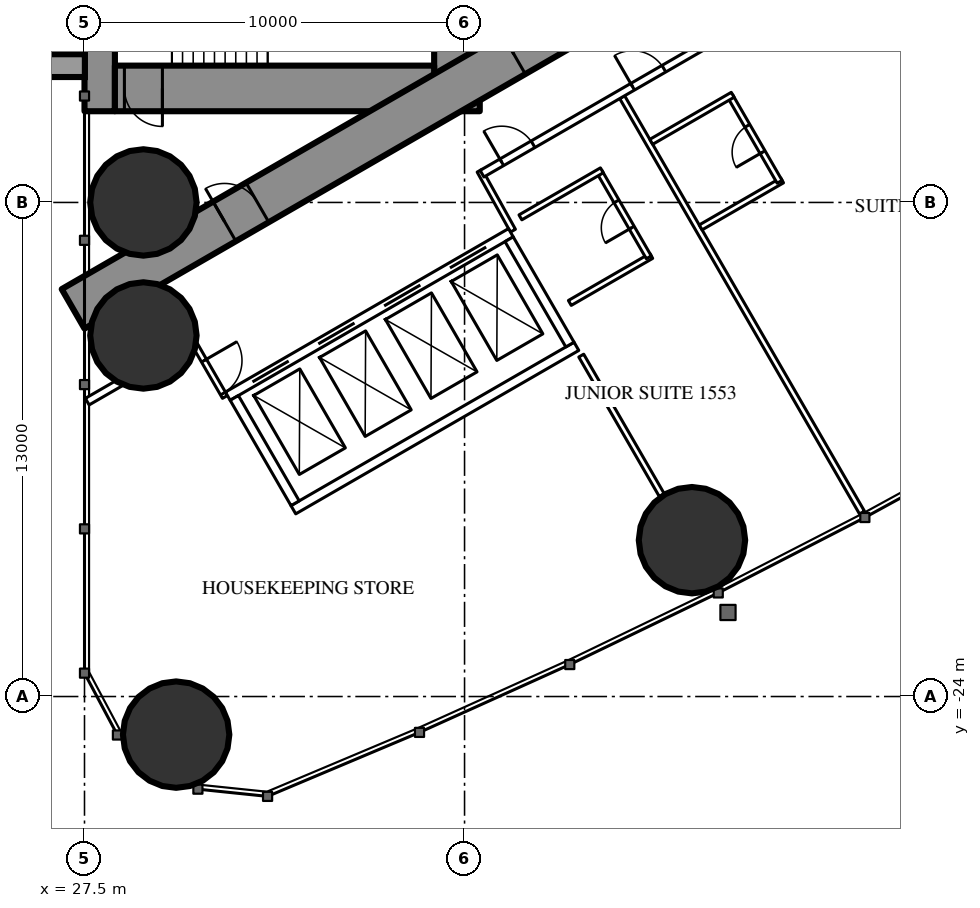
"""IFC4 building model, lengths in metres.
Left out: names, types, materials, properties, quantities, classifications, styles, units other than length and angle.
Written with IfcOpenShell. Run it as: python <this file> out.ifc"""

import sys

from ifc_helpers import new_model, si_unit, direction, frame, frame_2d, origin, origin_2d, place, context, subcontext, project, spatial, rectangle, hollow_circle, extrude, element, fill, save


model = new_model("IFC4")
c1 = context("Model", 3, precision=1e-05, world=origin(), true_north=direction((0.0, 1.0)))
c2 = subcontext(c1, "Body", "Model", "MODEL_VIEW")
j1 = project(units=[si_unit("LENGTHUNIT", "METRE"), si_unit("PLANEANGLEUNIT", "RADIAN")], contexts=[c1])
p1 = place(None, origin())
s1 = spatial("IfcSite", under=j1, at=p1, CompositionType="ELEMENT")
p2 = place(p1, origin())
s2 = spatial("IfcBuilding", under=s1, at=p2, CompositionType="ELEMENT")
p3 = place(p2, frame((0.0, 0.0, 60.0)))
s3 = spatial("IfcBuildingStorey", under=s2, at=p3, CompositionType="ELEMENT", Elevation=60.0)
for number, where, z_axis, x_axis in (
    (1, (29.911, -25.002, 0.0), (0.0, 0.0, 1.0), (1.0, 0.0, 0.0)),
    (2, (29.05, -11.0, 0.0), (0.0, 0.0, 1.0), (1.0, 0.0, 0.0)),
    (3, (29.05, -14.5, 0.0), (0.0, 0.0, 1.0), (1.0, 0.0, 0.0)),
    (4, (43.484, -19.886, 0.0), (0.0, 0.0, 1.0), (1.0, 0.0, 0.0)),
):
    element("IfcColumn", number, at=place(p3, frame(where, z_axis=z_axis, x_axis=x_axis)), inside=s3, PredefinedType="COLUMN", context=c2, shape_type="SweptSolid", body=[
        extrude(hollow_circle(Radius=1.4, WallThickness=0.12, at=origin_2d()), origin(), (0.0, 0.0, 1.0), 3.5),
    ])
p4 = place(p3, frame((27.9, -8.6, 0.0), z_axis=(0.0, 0.0, 1.0), x_axis=(0.0, 1.0, 0.0)))
e5 = element("IfcWall", 5, at=p4, inside=s3, PredefinedType="SHEAR", context=c2, shape_type="SweptSolid", body=[
    extrude(rectangle(XDim=17.2, YDim=0.8, at=frame_2d((8.6, 0.0))), origin(), (0.0, 0.0, 1.0), 3.5),
])
p5 = place(p4, frame((2.45, 0.0, 0.6)))
e6 = element("IfcOpeningElement", 6, at=p5, cuts=e5, PredefinedType="OPENING", context=c2, shape_type="SweptSolid", body=[
    extrude(rectangle(XDim=0.6, YDim=2.1, at=frame_2d((0.3, 1.05))), frame((0.0, 0.41, 0.0), z_axis=(0.0, -1.0, 0.0), x_axis=(1.0, 0.0, 0.0)), (0.0, 0.0, 1.0), 0.82),
])
p6 = place(p4, frame((14.15, 0.0, 0.6)))
e7 = element("IfcOpeningElement", 7, at=p6, cuts=e5, PredefinedType="OPENING", context=c2, shape_type="SweptSolid", body=[
    extrude(rectangle(XDim=0.6, YDim=2.1, at=frame_2d((0.3, 1.05))), frame((0.0, 0.41, 0.0), z_axis=(0.0, -1.0, 0.0), x_axis=(1.0, 0.0, 0.0)), (0.0, 0.0, 1.0), 0.82),
])
p7 = place(p3, frame((37.3, -8.6, 0.0), z_axis=(0.0, 0.0, 1.0), x_axis=(0.0, 1.0, 0.0)))
e8 = element("IfcWall", 8, at=p7, inside=s3, PredefinedType="SHEAR", context=c2, shape_type="SweptSolid", body=[
    extrude(rectangle(XDim=17.2, YDim=1.2, at=frame_2d((8.6, 0.0))), origin(), (0.0, 0.0, 1.0), 3.5),
])
p8 = place(p7, frame((7.7, 0.0, 0.0)))
e9 = element("IfcOpeningElement", 9, at=p8, cuts=e8, PredefinedType="OPENING", context=c2, shape_type="SweptSolid", body=[
    extrude(rectangle(XDim=1.8, YDim=2.2, at=frame_2d((0.9, 1.1))), frame((0.0, 0.61, 0.0), z_axis=(0.0, -1.0, 0.0), x_axis=(1.0, 0.0, 0.0)), (0.0, 0.0, 1.0), 1.22),
])
p9 = place(p3, frame((28.3, -8.0, 0.0), z_axis=(0.0, 0.0, 1.0), x_axis=(1.0, 0.0, 0.0)))
e10 = element("IfcWall", 10, at=p9, inside=s3, PredefinedType="SHEAR", context=c2, shape_type="SweptSolid", body=[
    extrude(rectangle(XDim=8.4, YDim=1.2, at=frame_2d((4.2, 0.0))), origin(), (0.0, 0.0, 1.0), 3.5),
])
p10 = place(p9, frame((0.25, 0.0, 0.0)))
e11 = element("IfcOpeningElement", 11, at=p10, cuts=e10, PredefinedType="OPENING", context=c2, shape_type="SweptSolid", body=[
    extrude(rectangle(XDim=1.0, YDim=2.2, at=frame_2d((0.5, 1.1))), frame((0.0, 0.61, 0.0), z_axis=(0.0, -1.0, 0.0), x_axis=(1.0, 0.0, 0.0)), (0.0, 0.0, 1.0), 1.22),
])
p11 = place(p3, frame((27.2, -13.8, 0.0), z_axis=(0.0, 0.0, 1.0), x_axis=(0.866027159892, 0.499996958321, 0.0)))
e12 = element("IfcWall", 12, at=p11, inside=s3, PredefinedType="SHEAR", context=c2, shape_type="SweptSolid", body=[
    extrude(rectangle(XDim=27.947, YDim=1.2, at=frame_2d((13.973, 0.0))), origin(), (0.0, 0.0, 1.0), 3.5),
])
p12 = place(p11, frame((4.6, 0.0, 0.0)))
e13 = element("IfcOpeningElement", 13, at=p12, cuts=e12, PredefinedType="OPENING", context=c2, shape_type="SweptSolid", body=[
    extrude(rectangle(XDim=1.0, YDim=2.2, at=frame_2d((0.5, 1.1))), frame((0.0, 0.61, 0.0), z_axis=(0.0, -1.0, 0.0), x_axis=(1.0, 0.0, 0.0)), (0.0, 0.0, 1.0), 1.22),
])
p13 = place(p11, frame((13.395, 0.0, 0.0)))
e14 = element("IfcOpeningElement", 14, at=p13, cuts=e12, PredefinedType="OPENING", context=c2, shape_type="SweptSolid", body=[
    extrude(rectangle(XDim=1.8, YDim=2.2, at=frame_2d((0.9, 1.1))), frame((0.0, 0.61, 0.0), z_axis=(0.0, -1.0, 0.0), x_axis=(1.0, 0.0, 0.0)), (0.0, 0.0, 1.0), 1.22),
])
p14 = place(p3, frame((41.647, -8.23, 0.0), z_axis=(0.0, 0.0, 1.0), x_axis=(0.49998590462, -0.866033541603, 0.0)))
e15 = element("IfcWall", 15, at=p14, inside=s3, PredefinedType="PARTITIONING", context=c2, shape_type="SweptSolid", body=[
    extrude(rectangle(XDim=12.621, YDim=0.15, at=frame_2d((6.311, 0.0))), origin(), (0.0, 0.0, 1.0), 3.25),
])
p15 = place(p3, frame((40.57, -15.03, 0.0), z_axis=(0.0, 0.0, 1.0), x_axis=(0.500012993597, -0.866017901798, 0.0)))
e16 = element("IfcWall", 16, at=p15, inside=s3, PredefinedType="PARTITIONING", context=c2, shape_type="SweptSolid", body=[
    extrude(rectangle(XDim=4.243, YDim=0.15, at=frame_2d((2.122, 0.0))), origin(), (0.0, 0.0, 1.0), 3.25),
])
p16 = place(p3, frame((27.572, -16.241, 0.0), z_axis=(0.0, 0.0, 1.0), x_axis=(0.866029654818, 0.499992636921, 0.0)))
e17 = element("IfcWall", 17, at=p16, inside=s3, PredefinedType="PARTITIONING", context=c2, shape_type="SweptSolid", body=[
    extrude(rectangle(XDim=3.155, YDim=0.2, at=frame_2d((1.577, 0.0))), origin(), (0.0, 0.0, 1.0), 3.25),
])
p17 = place(p3, frame((38.773, -11.742, 0.0), z_axis=(0.0, 0.0, 1.0), x_axis=(-0.485528096672, 0.8742210632, 0.0)))
e18 = element("IfcWall", 18, at=p17, inside=s3, PredefinedType="PARTITIONING", context=c2, shape_type="SweptSolid", body=[
    extrude(rectangle(XDim=1.805, YDim=0.15, at=frame_2d((0.903, 0.0))), origin(), (0.0, 0.0, 1.0), 3.25),
])
p18 = place(p3, frame((30.293, -14.554, 0.0), z_axis=(0.0, 0.0, 1.0), x_axis=(0.499980071345, -0.866036909293, 0.0)))
e19 = element("IfcWall", 19, at=p18, inside=s3, PredefinedType="PARTITIONING", context=c2, shape_type="SweptSolid", body=[
    extrude(rectangle(XDim=1.805, YDim=0.15, at=frame_2d((0.902, 0.0))), origin(), (0.0, 0.0, 1.0), 3.25),
])
p19 = place(p18, frame((0.702, 0.0, 0.0)))
e20 = element("IfcOpeningElement", 20, at=p19, cuts=e19, PredefinedType="OPENING", context=c2, shape_type="SweptSolid", body=[
    extrude(rectangle(XDim=1.0, YDim=2.2, at=frame_2d((0.5, 1.1))), frame((0.0, 0.085, 0.0), z_axis=(0.0, -1.0, 0.0), x_axis=(1.0, 0.0, 0.0)), (0.0, 0.0, 1.0), 0.17),
])
p20 = place(p3, frame((37.96, -10.243, 0.0), z_axis=(0.0, 0.0, 1.0), x_axis=(0.866030548046, 0.499991089772, 0.0)))
e21 = element("IfcWall", 21, at=p20, inside=s3, PredefinedType="PARTITIONING", context=c2, shape_type="SweptSolid", body=[
    extrude(rectangle(XDim=12.849, YDim=0.2, at=frame_2d((6.425, 0.0))), origin(), (0.0, 0.0, 1.0), 3.25),
])
p21 = place(p20, frame((4.575, 0.0, 0.0)))
e22 = element("IfcOpeningElement", 22, at=p21, cuts=e21, PredefinedType="OPENING", context=c2, shape_type="SweptSolid", body=[
    extrude(rectangle(XDim=0.95, YDim=2.2, at=frame_2d((0.475, 1.1))), frame((0.0, 0.11, 0.0), z_axis=(0.0, -1.0, 0.0), x_axis=(1.0, 0.0, 0.0)), (0.0, 0.0, 1.0), 0.22),
])
p22 = place(p20, frame((0.6, 0.0, 0.0)))
e23 = element("IfcOpeningElement", 23, at=p22, cuts=e21, PredefinedType="OPENING", context=c2, shape_type="SweptSolid", body=[
    extrude(rectangle(XDim=0.95, YDim=2.2, at=frame_2d((0.475, 1.1))), frame((0.0, 0.11, 0.0), z_axis=(0.0, -1.0, 0.0), x_axis=(1.0, 0.0, 0.0)), (0.0, 0.0, 1.0), 0.22),
])
p23 = place(p3, frame((43.712, -11.657, 0.0), z_axis=(0.0, 0.0, 1.0), x_axis=(0.866006523861, 0.500032699561, 0.0)))
e24 = element("IfcWall", 24, at=p23, inside=s3, PredefinedType="PARTITIONING", context=c2, shape_type="SweptSolid", body=[
    extrude(rectangle(XDim=2.475, YDim=0.15, at=frame_2d((1.237, 0.0))), origin(), (0.0, 0.0, 1.0), 3.25),
])
p24 = place(p3, frame((44.491, -8.205, 0.0), z_axis=(0.0, 0.0, 1.0), x_axis=(0.500047596559, -0.865997922154, 0.0)))
e25 = element("IfcWall", 25, at=p24, inside=s3, PredefinedType="PARTITIONING", context=c2, shape_type="SweptSolid", body=[
    extrude(rectangle(XDim=2.6, YDim=0.15, at=frame_2d((1.3, 0.0))), origin(), (0.0, 0.0, 1.0), 3.25),
])
p25 = place(p24, frame((0.9, 0.0, 0.0)))
e26 = element("IfcOpeningElement", 26, at=p25, cuts=e25, PredefinedType="OPENING", context=c2, shape_type="SweptSolid", body=[
    extrude(rectangle(XDim=0.8, YDim=2.2, at=frame_2d((0.4, 1.1))), frame((0.0, 0.085, 0.0), z_axis=(0.0, -1.0, 0.0), x_axis=(1.0, 0.0, 0.0)), (0.0, 0.0, 1.0), 0.17),
])
p26 = place(p3, frame((42.412, -9.405, 0.0), z_axis=(0.0, 0.0, 1.0), x_axis=(0.866006523861, 0.500032699561, 0.0)))
e27 = element("IfcWall", 27, at=p26, inside=s3, PredefinedType="PARTITIONING", context=c2, shape_type="SweptSolid", body=[
    extrude(rectangle(XDim=2.475, YDim=0.15, at=frame_2d((1.237, 0.0))), origin(), (0.0, 0.0, 1.0), 3.25),
])
p27 = place(p3, frame((40.27, -13.644, 0.0), z_axis=(0.0, 0.0, 1.0), x_axis=(0.866031185235, 0.4999899861, 0.0)))
e28 = element("IfcWall", 28, at=p27, inside=s3, PredefinedType="PARTITIONING", context=c2, shape_type="SweptSolid", body=[
    extrude(rectangle(XDim=2.475, YDim=0.15, at=frame_2d((1.238, 0.0))), origin(), (0.0, 0.0, 1.0), 3.25),
])
p28 = place(p3, frame((41.048, -10.193, 0.0), z_axis=(0.0, 0.0, 1.0), x_axis=(0.500047596559, -0.865997922154, 0.0)))
e29 = element("IfcWall", 29, at=p28, inside=s3, PredefinedType="PARTITIONING", context=c2, shape_type="SweptSolid", body=[
    extrude(rectangle(XDim=2.6, YDim=0.15, at=frame_2d((1.3, 0.0))), origin(), (0.0, 0.0, 1.0), 3.25),
])
p29 = place(p28, frame((0.9, 0.0, 0.0)))
e30 = element("IfcOpeningElement", 30, at=p29, cuts=e29, PredefinedType="OPENING", context=c2, shape_type="SweptSolid", body=[
    extrude(rectangle(XDim=0.8, YDim=2.2, at=frame_2d((0.4, 1.1))), frame((0.0, 0.085, 0.0), z_axis=(0.0, -1.0, 0.0), x_axis=(1.0, 0.0, 0.0)), (0.0, 0.0, 1.0), 0.17),
])
p30 = place(p3, frame((38.97, -11.393, 0.0), z_axis=(0.0, 0.0, 1.0), x_axis=(0.866031185235, 0.4999899861, 0.0)))
e31 = element("IfcWall", 31, at=p30, inside=s3, PredefinedType="PARTITIONING", context=c2, shape_type="SweptSolid", body=[
    extrude(rectangle(XDim=2.475, YDim=0.15, at=frame_2d((1.238, 0.0))), origin(), (0.0, 0.0, 1.0), 3.25),
])
p31 = place(p3, frame((31.271, -16.097, 0.0), z_axis=(0.0, 0.0, 1.0), x_axis=(0.86604045752, 0.499973925258, 0.0)))
e32 = element("IfcWall", 32, at=p31, inside=s3, PredefinedType="PARTITIONING", context=c2, shape_type="SweptSolid", body=[
    extrude(rectangle(XDim=8.6, YDim=0.25, at=frame_2d((4.3, 0.0))), origin(), (0.0, 0.0, 1.0), 3.25),
])
p32 = place(p31, frame((0.75, 0.0, 0.0)))
e33 = element("IfcOpeningElement", 33, at=p32, cuts=e32, PredefinedType="OPENING", context=c2, shape_type="SweptSolid", body=[
    extrude(rectangle(XDim=1.1, YDim=2.2, at=frame_2d((0.55, 1.1))), frame((0.0, 0.135, 0.0), z_axis=(0.0, -1.0, 0.0), x_axis=(1.0, 0.0, 0.0)), (0.0, 0.0, 1.0), 0.27),
])
p33 = place(p31, frame((2.75, 0.0, 0.0)))
e34 = element("IfcOpeningElement", 34, at=p33, cuts=e32, PredefinedType="OPENING", context=c2, shape_type="SweptSolid", body=[
    extrude(rectangle(XDim=1.1, YDim=2.2, at=frame_2d((0.55, 1.1))), frame((0.0, 0.135, 0.0), z_axis=(0.0, -1.0, 0.0), x_axis=(1.0, 0.0, 0.0)), (0.0, 0.0, 1.0), 0.27),
])
p34 = place(p31, frame((4.75, 0.0, 0.0)))
e35 = element("IfcOpeningElement", 35, at=p34, cuts=e32, PredefinedType="OPENING", context=c2, shape_type="SweptSolid", body=[
    extrude(rectangle(XDim=1.1, YDim=2.2, at=frame_2d((0.55, 1.1))), frame((0.0, 0.135, 0.0), z_axis=(0.0, -1.0, 0.0), x_axis=(1.0, 0.0, 0.0)), (0.0, 0.0, 1.0), 0.27),
])
p35 = place(p31, frame((6.75, 0.0, 0.0)))
e36 = element("IfcOpeningElement", 36, at=p35, cuts=e32, PredefinedType="OPENING", context=c2, shape_type="SweptSolid", body=[
    extrude(rectangle(XDim=1.1, YDim=2.2, at=frame_2d((0.55, 1.1))), frame((0.0, 0.135, 0.0), z_axis=(0.0, -1.0, 0.0), x_axis=(1.0, 0.0, 0.0)), (0.0, 0.0, 1.0), 0.27),
])
p36 = place(p3, frame((32.996, -19.086, 0.0), z_axis=(0.0, 0.0, 1.0), x_axis=(0.866028165386, 0.499995216735, 0.0)))
e37 = element("IfcWall", 37, at=p36, inside=s3, PredefinedType="PARTITIONING", context=c2, shape_type="SweptSolid", body=[
    extrude(rectangle(XDim=8.6, YDim=0.25, at=frame_2d((4.3, 0.0))), origin(), (0.0, 0.0, 1.0), 3.25),
])
for number, where, z_axis, x_axis in (
    (38, (31.441, -16.143, 0.0), (0.0, 0.0, 1.0), (0.5, -0.866, 0.0)),
    (39, (38.673, -11.968, 0.0), (0.0, 0.0, 1.0), (0.5, -0.866, 0.0)),
):
    element("IfcWall", number, at=place(p3, frame(where, z_axis=z_axis, x_axis=x_axis)), inside=s3, PredefinedType="PARTITIONING", context=c2, shape_type="SweptSolid", body=[
        extrude(rectangle(XDim=3.201, YDim=0.25, at=frame_2d((1.6, 0.0))), origin(), (0.0, 0.0, 1.0), 3.25),
    ])
p37 = place(p25, origin())
e40 = element("IfcDoor", 40, at=p37, inside=s3, OperationType="SINGLE_SWING_RIGHT", PredefinedType="DOOR", context=c2, shape_type="SweptSolid", body=[
    extrude(rectangle(XDim=0.8, YDim=2.2, at=frame_2d((0.4, 1.1))), frame((0.0, 0.025, 0.0), z_axis=(0.0, -1.0, 0.0), x_axis=(1.0, 0.0, 0.0)), (0.0, 0.0, 1.0), 0.05),
])
fill(e26, e40)
p38 = place(p21, origin())
e41 = element("IfcDoor", 41, at=p38, inside=s3, OperationType="SINGLE_SWING_LEFT", PredefinedType="DOOR", context=c2, shape_type="SweptSolid", body=[
    extrude(rectangle(XDim=0.95, YDim=2.2, at=frame_2d((0.475, 1.1))), frame((0.0, 0.025, 0.0), z_axis=(0.0, -1.0, 0.0), x_axis=(1.0, 0.0, 0.0)), (0.0, 0.0, 1.0), 0.05),
])
fill(e22, e41)
p39 = place(p29, origin())
e42 = element("IfcDoor", 42, at=p39, inside=s3, OperationType="SINGLE_SWING_RIGHT", PredefinedType="DOOR", context=c2, shape_type="SweptSolid", body=[
    extrude(rectangle(XDim=0.8, YDim=2.2, at=frame_2d((0.4, 1.1))), frame((0.0, 0.025, 0.0), z_axis=(0.0, -1.0, 0.0), x_axis=(1.0, 0.0, 0.0)), (0.0, 0.0, 1.0), 0.05),
])
fill(e30, e42)
p40 = place(p22, origin())
e43 = element("IfcDoor", 43, at=p40, inside=s3, OperationType="SINGLE_SWING_LEFT", PredefinedType="DOOR", context=c2, shape_type="SweptSolid", body=[
    extrude(rectangle(XDim=0.95, YDim=2.2, at=frame_2d((0.475, 1.1))), frame((0.0, 0.025, 0.0), z_axis=(0.0, -1.0, 0.0), x_axis=(1.0, 0.0, 0.0)), (0.0, 0.0, 1.0), 0.05),
])
fill(e23, e43)
p41 = place(p19, origin())
e44 = element("IfcDoor", 44, at=p41, inside=s3, OperationType="SINGLE_SWING_LEFT", PredefinedType="DOOR", context=c2, shape_type="SweptSolid", body=[
    extrude(rectangle(XDim=1.0, YDim=2.2, at=frame_2d((0.5, 1.1))), frame((0.0, 0.025, 0.0), z_axis=(0.0, -1.0, 0.0), x_axis=(1.0, 0.0, 0.0)), (0.0, 0.0, 1.0), 0.05),
])
fill(e20, e44)
p42 = place(p12, origin())
e45 = element("IfcDoor", 45, at=p42, inside=s3, OperationType="SINGLE_SWING_LEFT", PredefinedType="DOOR", context=c2, shape_type="SweptSolid", body=[
    extrude(rectangle(XDim=1.0, YDim=2.2, at=frame_2d((0.5, 1.1))), frame((0.0, 0.025, 0.0), z_axis=(0.0, -1.0, 0.0), x_axis=(1.0, 0.0, 0.0)), (0.0, 0.0, 1.0), 0.05),
])
fill(e13, e45)
p43 = place(p13, origin())
e46 = element("IfcDoor", 46, at=p43, inside=s3, OperationType="DOUBLE_DOOR_SINGLE_SWING", PredefinedType="DOOR", context=c2, shape_type="SweptSolid", body=[
    extrude(rectangle(XDim=1.8, YDim=2.2, at=frame_2d((0.9, 1.1))), frame((0.0, 0.025, 0.0), z_axis=(0.0, -1.0, 0.0), x_axis=(1.0, 0.0, 0.0)), (0.0, 0.0, 1.0), 0.05),
])
fill(e14, e46)
p44 = place(p10, origin())
e47 = element("IfcDoor", 47, at=p44, inside=s3, OperationType="SINGLE_SWING_RIGHT", PredefinedType="DOOR", context=c2, shape_type="SweptSolid", body=[
    extrude(rectangle(XDim=1.0, YDim=2.2, at=frame_2d((0.5, 1.1))), frame((0.0, 0.025, 0.0), z_axis=(0.0, -1.0, 0.0), x_axis=(1.0, 0.0, 0.0)), (0.0, 0.0, 1.0), 0.05),
])
fill(e11, e47)
p45 = place(p32, origin())
e48 = element("IfcDoor", 48, at=p45, inside=s3, OperationType="DOUBLE_DOOR_SLIDING", PredefinedType="USERDEFINED", context=c2, shape_type="SweptSolid", body=[
    extrude(rectangle(XDim=1.1, YDim=2.2, at=frame_2d((0.55, 1.1))), frame((0.0, 0.025, 0.0), z_axis=(0.0, -1.0, 0.0), x_axis=(1.0, 0.0, 0.0)), (0.0, 0.0, 1.0), 0.05),
])
fill(e33, e48)
p46 = place(p33, origin())
e49 = element("IfcDoor", 49, at=p46, inside=s3, OperationType="DOUBLE_DOOR_SLIDING", PredefinedType="USERDEFINED", context=c2, shape_type="SweptSolid", body=[
    extrude(rectangle(XDim=1.1, YDim=2.2, at=frame_2d((0.55, 1.1))), frame((0.0, 0.025, 0.0), z_axis=(0.0, -1.0, 0.0), x_axis=(1.0, 0.0, 0.0)), (0.0, 0.0, 1.0), 0.05),
])
fill(e34, e49)
p47 = place(p34, origin())
e50 = element("IfcDoor", 50, at=p47, inside=s3, OperationType="DOUBLE_DOOR_SLIDING", PredefinedType="USERDEFINED", context=c2, shape_type="SweptSolid", body=[
    extrude(rectangle(XDim=1.1, YDim=2.2, at=frame_2d((0.55, 1.1))), frame((0.0, 0.025, 0.0), z_axis=(0.0, -1.0, 0.0), x_axis=(1.0, 0.0, 0.0)), (0.0, 0.0, 1.0), 0.05),
])
fill(e35, e50)
p48 = place(p35, origin())
e51 = element("IfcDoor", 51, at=p48, inside=s3, OperationType="DOUBLE_DOOR_SLIDING", PredefinedType="USERDEFINED", context=c2, shape_type="SweptSolid", body=[
    extrude(rectangle(XDim=1.1, YDim=2.2, at=frame_2d((0.55, 1.1))), frame((0.0, 0.025, 0.0), z_axis=(0.0, -1.0, 0.0), x_axis=(1.0, 0.0, 0.0)), (0.0, 0.0, 1.0), 0.05),
])
fill(e36, e51)
save(model, sys.argv[1])
